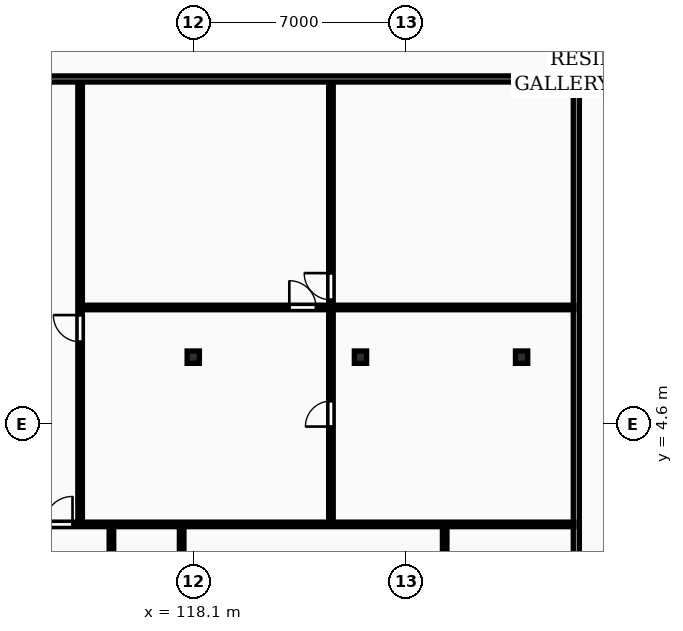
"""IFC4 building model, lengths in metres.
Left out: names, types, materials, properties, quantities, classifications, styles, units other than length and angle.
Written with IfcOpenShell. Run it as: python <this file> out.ifc"""

import sys

from ifc_helpers import new_model, si_unit, direction, frame, frame_2d, origin, origin_2d, place, context, subcontext, project, spatial, rectangle, i_section, extrude, element, fill, save


model = new_model("IFC4")
c1 = context("Model", 3, precision=1e-05, world=origin(), true_north=direction((0.0, 1.0)))
c2 = subcontext(c1, "Body", "Model", "MODEL_VIEW")
j1 = project(units=[si_unit("LENGTHUNIT", "METRE"), si_unit("PLANEANGLEUNIT", "RADIAN")], contexts=[c1])
p1 = place(None, origin())
s1 = spatial("IfcSite", under=j1, at=p1, CompositionType="ELEMENT")
p2 = place(p1, origin())
s2 = spatial("IfcBuilding", under=s1, at=p2, CompositionType="ELEMENT")
p3 = place(p2, frame((0.0, 0.0, 142.9)))
s3 = spatial("IfcBuildingStorey", under=s2, at=p3, CompositionType="ELEMENT", Elevation=142.9)
for number, where, z_axis, x_axis in (
    (1, (118.1, 6.8, 0.0), (0.0, 0.0, 1.0), (1.0, 0.0, 0.0)),
    (2, (123.6, 6.8, 0.0), (0.0, 0.0, 1.0), (1.0, 0.0, 0.0)),
    (3, (128.9, 6.8, 0.0), (0.0, 0.0, 1.0), (1.0, 0.0, 0.0)),
):
    element("IfcColumn", number, at=place(p3, frame(where, z_axis=z_axis, x_axis=x_axis)), inside=s3, PredefinedType="COLUMN", context=c2, shape_type="SweptSolid", body=[
        extrude(i_section(OverallWidth=0.403, OverallDepth=0.406, WebThickness=0.027, FlangeThickness=0.043, FilletRadius=0.015, at=origin_2d()), origin(), (0.0, 0.0, 1.0), 3.6),
    ])
p4 = place(p3, frame((130.7, -8.7, 0.0), z_axis=(0.0, 0.0, 1.0), x_axis=(0.0, 1.0, 0.0)))
e4 = element("IfcWall", 4, at=p4, inside=s3, PredefinedType="PARTITIONING", context=c2, shape_type="SweptSolid", body=[
    extrude(rectangle(XDim=24.57, YDim=0.2, at=frame_2d((12.285, 0.0))), origin(), (0.0, 0.0, 1.0), 3.31),
])
p5 = place(p3, frame((122.629, 1.34, 0.0), z_axis=(0.0, 0.0, 1.0), x_axis=(0.0, 1.0, 0.0)))
e5 = element("IfcWall", 5, at=p5, inside=s3, PredefinedType="PARTITIONING", context=c2, shape_type="SweptSolid", body=[
    extrude(rectangle(XDim=14.55, YDim=0.15, at=frame_2d((7.275, 0.0))), origin(), (0.0, 0.0, 1.0), 3.31),
])
p6 = place(p5, frame((3.177, 0.0, 0.0)))
e6 = element("IfcOpeningElement", 6, at=p6, cuts=e5, PredefinedType="OPENING", context=c2, shape_type="SweptSolid", body=[
    extrude(rectangle(XDim=0.84, YDim=2.04, at=frame_2d((0.42, 1.02))), frame((0.0, 0.085, 0.0), z_axis=(0.0, -1.0, 0.0), x_axis=(1.0, 0.0, 0.0)), (0.0, 0.0, 1.0), 0.17),
])
p7 = place(p5, frame((7.345, 0.0, 0.0)))
e7 = element("IfcOpeningElement", 7, at=p7, cuts=e5, PredefinedType="OPENING", context=c2, shape_type="SweptSolid", body=[
    extrude(rectangle(XDim=0.88, YDim=2.06, at=frame_2d((0.44, 1.03))), frame((0.0, 0.085, 0.0), z_axis=(0.0, -1.0, 0.0), x_axis=(1.0, 0.0, 0.0)), (0.0, 0.0, 1.0), 0.17),
])
p8 = place(p3, frame((114.438, 8.435, 0.0), z_axis=(0.0, 0.0, 1.0), x_axis=(1.0, 0.0, 0.0)))
e8 = element("IfcWall", 8, at=p8, inside=s3, PredefinedType="PARTITIONING", context=c2, shape_type="SweptSolid", body=[
    extrude(rectangle(XDim=16.182, YDim=0.15, at=frame_2d((8.091, 0.0))), origin(), (0.0, 0.0, 1.0), 3.31),
])
p9 = place(p8, frame((6.821, 0.0, 0.0)))
e9 = element("IfcOpeningElement", 9, at=p9, cuts=e8, PredefinedType="OPENING", context=c2, shape_type="SweptSolid", body=[
    extrude(rectangle(XDim=0.88, YDim=2.06, at=frame_2d((0.44, 1.03))), frame((0.0, 0.085, 0.0), z_axis=(0.0, -1.0, 0.0), x_axis=(1.0, 0.0, 0.0)), (0.0, 0.0, 1.0), 0.17),
])
p10 = place(p3, frame((114.378, 1.34, 0.0), z_axis=(0.0, 0.0, 1.0), x_axis=(0.0, 1.0, 0.0)))
e10 = element("IfcWall", 10, at=p10, inside=s3, PredefinedType="PARTITIONING", context=c2, shape_type="SweptSolid", body=[
    extrude(rectangle(XDim=14.55, YDim=0.15, at=frame_2d((7.275, 0.0))), origin(), (0.0, 0.0, 1.0), 3.31),
])
p11 = place(p10, frame((5.965, 0.0, 0.0)))
e11 = element("IfcOpeningElement", 11, at=p11, cuts=e10, PredefinedType="OPENING", context=c2, shape_type="SweptSolid", body=[
    extrude(rectangle(XDim=0.88, YDim=2.06, at=frame_2d((0.44, 1.03))), frame((0.0, 0.085, 0.0), z_axis=(0.0, -1.0, 0.0), x_axis=(1.0, 0.0, 0.0)), (0.0, 0.0, 1.0), 0.17),
])
p12 = place(p3, frame((117.718, -1.43, 0.0), z_axis=(0.0, 0.0, 1.0), x_axis=(0.0, 1.0, 0.0)))
e12 = element("IfcWall", 12, at=p12, inside=s3, PredefinedType="PARTITIONING", context=c2, shape_type="SweptSolid", body=[
    extrude(rectangle(XDim=2.69, YDim=0.15, at=frame_2d((1.345, 0.0))), origin(), (0.0, 0.0, 1.0), 3.31),
])
p13 = place(p3, frame((115.408, -8.7, 0.0), z_axis=(0.0, 0.0, 1.0), x_axis=(0.0, 1.0, 0.0)))
e13 = element("IfcWall", 13, at=p13, inside=s3, PredefinedType="PARTITIONING", context=c2, shape_type="SweptSolid", body=[
    extrude(rectangle(XDim=9.96, YDim=0.15, at=frame_2d((4.98, 0.0))), origin(), (0.0, 0.0, 1.0), 3.31),
])
p14 = place(p13, frame((5.22, 0.0, 0.0)))
e14 = element("IfcOpeningElement", 14, at=p14, cuts=e13, PredefinedType="OPENING", context=c2, shape_type="SweptSolid", body=[
    extrude(rectangle(XDim=0.92, YDim=2.08, at=frame_2d((0.46, 1.04))), frame((0.0, 0.085, 0.0), z_axis=(0.0, -1.0, 0.0), x_axis=(1.0, 0.0, 0.0)), (0.0, 0.0, 1.0), 0.17),
])
p15 = place(p3, frame((126.37, -1.43, 0.0), z_axis=(0.0, 0.0, 1.0), x_axis=(0.0, 1.0, 0.0)))
e15 = element("IfcWall", 15, at=p15, inside=s3, PredefinedType="PARTITIONING", context=c2, shape_type="SweptSolid", body=[
    extrude(rectangle(XDim=2.69, YDim=0.15, at=frame_2d((1.345, 0.0))), origin(), (0.0, 0.0, 1.0), 3.31),
])
p16 = place(p3, frame((110.488, 1.3, 0.0), z_axis=(0.0, 0.0, 1.0), x_axis=(1.0, 0.0, 0.0)))
e16 = element("IfcWall", 16, at=p16, inside=s3, PredefinedType="PARTITIONING", context=c2, shape_type="SweptSolid", body=[
    extrude(rectangle(XDim=20.132, YDim=0.15, at=frame_2d((10.066, 0.0))), origin(), (0.0, 0.0, 1.0), 3.31),
])
p17 = place(p16, frame((2.72, 0.0, 0.0)))
e17 = element("IfcOpeningElement", 17, at=p17, cuts=e16, PredefinedType="OPENING", context=c2, shape_type="SweptSolid", body=[
    extrude(rectangle(XDim=0.92, YDim=2.08, at=frame_2d((0.46, 1.04))), frame((0.0, 0.085, 0.0), z_axis=(0.0, -1.0, 0.0), x_axis=(1.0, 0.0, 0.0)), (0.0, 0.0, 1.0), 0.17),
])
p18 = place(p3, frame((72.7, 15.95, 0.0), z_axis=(0.0, 0.0, 1.0), x_axis=(1.0, 0.0, 0.0)))
e18 = element("IfcWall", 18, at=p18, inside=s3, PredefinedType="PARTITIONING", context=c2, shape_type="SweptSolid", body=[
    extrude(rectangle(XDim=58.0, YDim=0.2, at=frame_2d((29.0, 0.0))), origin(), (0.0, 0.0, 1.0), 3.31),
])
p19 = place(p18, frame((2.045, 0.0, 0.0)))
e19 = element("IfcOpeningElement", 19, at=p19, cuts=e18, PredefinedType="OPENING", context=c2, shape_type="SweptSolid", body=[
    extrude(rectangle(XDim=0.95, YDim=2.15, at=frame_2d((0.475, 1.075))), frame((0.0, 0.11, 0.0), z_axis=(0.0, -1.0, 0.0), x_axis=(1.0, 0.0, 0.0)), (0.0, 0.0, 1.0), 0.22),
])
p20 = place(p18, frame((24.295, 0.0, 0.0)))
e20 = element("IfcOpeningElement", 20, at=p20, cuts=e18, PredefinedType="OPENING", context=c2, shape_type="SweptSolid", body=[
    extrude(rectangle(XDim=0.95, YDim=2.15, at=frame_2d((0.475, 1.075))), frame((0.0, 0.11, 0.0), z_axis=(0.0, -1.0, 0.0), x_axis=(1.0, 0.0, 0.0)), (0.0, 0.0, 1.0), 0.22),
])
p21 = place(p18, frame((39.753, 0.0, 0.0)))
e21 = element("IfcOpeningElement", 21, at=p21, cuts=e18, PredefinedType="OPENING", context=c2, shape_type="SweptSolid", body=[
    extrude(rectangle(XDim=0.95, YDim=2.15, at=frame_2d((0.475, 1.075))), frame((0.0, 0.11, 0.0), z_axis=(0.0, -1.0, 0.0), x_axis=(1.0, 0.0, 0.0)), (0.0, 0.0, 1.0), 0.22),
])
p22 = place(p6, origin())
e22 = element("IfcDoor", 22, at=p22, inside=s3, OperationType="SINGLE_SWING_LEFT", PredefinedType="DOOR", context=c2, shape_type="SweptSolid", body=[
    extrude(rectangle(XDim=0.84, YDim=2.04, at=frame_2d((0.42, 1.02))), frame((0.0, 0.025, 0.0), z_axis=(0.0, -1.0, 0.0), x_axis=(1.0, 0.0, 0.0)), (0.0, 0.0, 1.0), 0.05),
])
fill(e6, e22)
p23 = place(p7, origin())
e23 = element("IfcDoor", 23, at=p23, inside=s3, OperationType="SINGLE_SWING_RIGHT", PredefinedType="DOOR", context=c2, shape_type="SweptSolid", body=[
    extrude(rectangle(XDim=0.88, YDim=2.06, at=frame_2d((0.44, 1.03))), frame((0.0, 0.025, 0.0), z_axis=(0.0, -1.0, 0.0), x_axis=(1.0, 0.0, 0.0)), (0.0, 0.0, 1.0), 0.05),
])
fill(e7, e23)
p24 = place(p9, origin())
e24 = element("IfcDoor", 24, at=p24, inside=s3, OperationType="SINGLE_SWING_LEFT", PredefinedType="DOOR", context=c2, shape_type="SweptSolid", body=[
    extrude(rectangle(XDim=0.88, YDim=2.06, at=frame_2d((0.44, 1.03))), frame((0.0, 0.025, 0.0), z_axis=(0.0, -1.0, 0.0), x_axis=(1.0, 0.0, 0.0)), (0.0, 0.0, 1.0), 0.05),
])
fill(e9, e24)
p25 = place(p11, origin())
e25 = element("IfcDoor", 25, at=p25, inside=s3, OperationType="SINGLE_SWING_RIGHT", PredefinedType="DOOR", context=c2, shape_type="SweptSolid", body=[
    extrude(rectangle(XDim=0.88, YDim=2.06, at=frame_2d((0.44, 1.03))), frame((0.0, 0.025, 0.0), z_axis=(0.0, -1.0, 0.0), x_axis=(1.0, 0.0, 0.0)), (0.0, 0.0, 1.0), 0.05),
])
fill(e11, e25)
p26 = place(p17, origin())
e26 = element("IfcDoor", 26, at=p26, inside=s3, OperationType="SINGLE_SWING_RIGHT", PredefinedType="DOOR", context=c2, shape_type="SweptSolid", body=[
    extrude(rectangle(XDim=0.92, YDim=2.08, at=frame_2d((0.46, 1.04))), frame((0.0, 0.025, 0.0), z_axis=(0.0, -1.0, 0.0), x_axis=(1.0, 0.0, 0.0)), (0.0, 0.0, 1.0), 0.05),
])
fill(e17, e26)
save(model, sys.argv[1])
